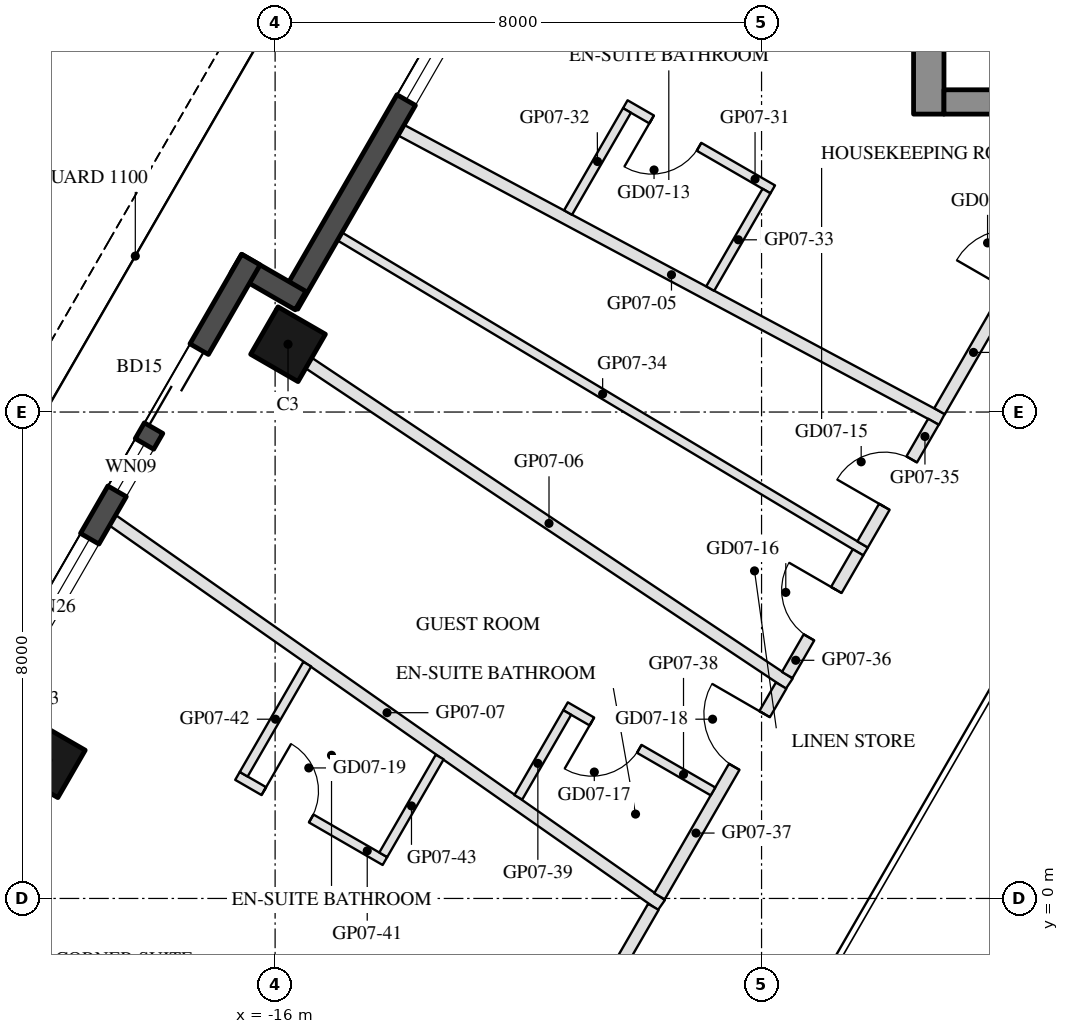
"""IFC4 building model, lengths in metres.
Left out: names, types, materials, properties, quantities, classifications, styles, units other than length and angle.
Written with IfcOpenShell. Run it as: python <this file> out.ifc"""

import sys

from ifc_helpers import new_model, si_unit, direction, frame, frame_2d, origin, origin_2d, place, context, subcontext, project, spatial, rectangle, hollow_rectangle, extrude, element, fill, save


model = new_model("IFC4")
c1 = context("Model", 3, precision=1e-05, world=origin(), true_north=direction((0.0, 1.0)))
c2 = subcontext(c1, "Body", "Model", "MODEL_VIEW")
j1 = project(units=[si_unit("LENGTHUNIT", "METRE"), si_unit("PLANEANGLEUNIT", "RADIAN")], contexts=[c1])
p1 = place(None, origin())
s1 = spatial("IfcSite", under=j1, at=p1, CompositionType="ELEMENT")
p2 = place(p1, origin())
s2 = spatial("IfcBuilding", under=s1, at=p2, CompositionType="ELEMENT")
p3 = place(p2, frame((0.0, 0.0, 94.6)))
s3 = spatial("IfcBuildingStorey", under=s2, at=p3, CompositionType="ELEMENT", Elevation=94.6)
for number, where, z_axis, x_axis in (
    (1, (-15.788, 9.115, 0.0), (0.0, 0.0, 1.0), (0.5, 0.866, 0.0)),
    (2, (-19.738, 2.273, 0.0), (0.0, 0.0, 1.0), (0.5, 0.866, 0.0)),
):
    element("IfcColumn", number, at=place(p3, frame(where, z_axis=z_axis, x_axis=x_axis)), inside=s3, PredefinedType="COLUMN", context=c2, shape_type="SweptSolid", body=[
        extrude(hollow_rectangle(XDim=0.9, YDim=0.9, WallThickness=0.04, at=origin_2d()), origin(), (0.0, 0.0, 1.0), 3.7),
    ])
p4 = place(p3, frame((-12.409, 15.617, 0.0), z_axis=(0.0, 0.0, 1.0), x_axis=(-0.500003597184, -0.866023326939, 0.0)))
e3 = element("IfcWall", 3, at=p4, inside=s3, PredefinedType="SOLIDWALL", context=c2, shape_type="SweptSolid", body=[
    extrude(rectangle(XDim=6.74, YDim=0.35, at=frame_2d((3.37, 0.0))), origin(), (0.0, 0.0, 1.0), 3.55),
])
p5 = place(p4, frame((0.77, 0.0, 0.3)))
e4 = element("IfcOpeningElement", 4, at=p5, cuts=e3, PredefinedType="OPENING", context=c2, shape_type="SweptSolid", body=[
    extrude(rectangle(XDim=2.1, YDim=2.65, at=frame_2d((1.05, 1.325))), frame((0.0, 0.185, 0.0), z_axis=(0.0, -1.0, 0.0), x_axis=(1.0, 0.0, 0.0)), (0.0, 0.0, 1.0), 0.37),
])
p6 = place(p3, frame((-15.581, 9.833, 0.0), z_axis=(0.0, 0.0, 1.0), x_axis=(-0.866055662726, 0.499947586314, 0.0)))
e5 = element("IfcWall", 5, at=p6, inside=s3, PredefinedType="SOLIDWALL", context=c2, shape_type="SweptSolid", body=[
    extrude(rectangle(XDim=1.22, YDim=0.35, at=frame_2d((0.61, 0.0))), origin(), (0.0, 0.0, 1.0), 3.55),
])
p7 = place(p3, frame((-16.398, 10.507, 0.0), z_axis=(0.0, 0.0, 1.0), x_axis=(-0.499999142773, -0.866025898704, 0.0)))
e6 = element("IfcWall", 6, at=p7, inside=s3, PredefinedType="SOLIDWALL", context=c2, shape_type="SweptSolid", body=[
    extrude(rectangle(XDim=9.7, YDim=0.35, at=frame_2d((4.85, 0.0))), origin(), (0.0, 0.0, 1.0), 3.55),
])
p8 = place(p7, frame((1.7, 0.0, 0.0)))
e7 = element("IfcOpeningElement", 7, at=p8, cuts=e6, PredefinedType="OPENING", context=c2, shape_type="SweptSolid", body=[
    extrude(rectangle(XDim=1.5, YDim=2.4, at=frame_2d((0.75, 1.2))), frame((0.0, 0.185, 0.0), z_axis=(0.0, -1.0, 0.0), x_axis=(1.0, 0.0, 0.0)), (0.0, 0.0, 1.0), 0.37),
])
p9 = place(p7, frame((3.5, 0.0, 0.3)))
e8 = element("IfcOpeningElement", 8, at=p9, cuts=e6, PredefinedType="OPENING", context=c2, shape_type="SweptSolid", body=[
    extrude(rectangle(XDim=0.9, YDim=2.65, at=frame_2d((0.45, 1.325))), frame((0.0, 0.185, 0.0), z_axis=(0.0, -1.0, 0.0), x_axis=(1.0, 0.0, 0.0)), (0.0, 0.0, 1.0), 0.37),
])
p10 = place(p7, frame((5.301, 0.0, 0.3)))
e9 = element("IfcOpeningElement", 9, at=p10, cuts=e6, PredefinedType="OPENING", context=c2, shape_type="SweptSolid", body=[
    extrude(rectangle(XDim=2.6, YDim=2.65, at=frame_2d((1.3, 1.325))), frame((0.0, 0.185, 0.0), z_axis=(0.0, -1.0, 0.0), x_axis=(1.0, 0.0, 0.0)), (0.0, 0.0, 1.0), 0.37),
])
p11 = place(p3, frame((-5.25, 12.9, 0.0), z_axis=(0.0, 0.0, 1.0), x_axis=(0.0, 1.0, 0.0)))
e10 = element("IfcWall", 10, at=p11, inside=s3, PredefinedType="SHEAR", context=c2, shape_type="SweptSolid", body=[
    extrude(rectangle(XDim=14.837, YDim=0.5, at=frame_2d((7.418, 0.0))), origin(), (0.0, 0.0, 1.0), 3.5),
])
p12 = place(p3, frame((5.0, 13.1, 0.0), z_axis=(0.0, 0.0, 1.0), x_axis=(-1.0, 0.0, 0.0)))
e11 = element("IfcWall", 11, at=p12, inside=s3, PredefinedType="SHEAR", context=c2, shape_type="SweptSolid", body=[
    extrude(rectangle(XDim=10.0, YDim=0.4, at=frame_2d((5.0, 0.0))), origin(), (0.0, 0.0, 1.0), 3.5),
])
p13 = place(p12, frame((3.55, 0.0, 0.0)))
e12 = element("IfcOpeningElement", 12, at=p13, cuts=e11, PredefinedType="OPENING", context=c2, shape_type="SweptSolid", body=[
    extrude(rectangle(XDim=1.1, YDim=2.1, at=frame_2d((0.55, 1.05))), frame((0.0, 0.21, 0.0), z_axis=(0.0, -1.0, 0.0), x_axis=(1.0, 0.0, 0.0)), (0.0, 0.0, 1.0), 0.42),
])
p14 = place(p12, frame((5.85, 0.0, 0.0)))
e13 = element("IfcOpeningElement", 13, at=p14, cuts=e11, PredefinedType="OPENING", context=c2, shape_type="SweptSolid", body=[
    extrude(rectangle(XDim=1.4, YDim=2.1, at=frame_2d((0.7, 1.05))), frame((0.0, 0.21, 0.0), z_axis=(0.0, -1.0, 0.0), x_axis=(1.0, 0.0, 0.0)), (0.0, 0.0, 1.0), 0.42),
])
p15 = place(p3, frame((-13.928, 12.636, 0.0), z_axis=(0.0, 0.0, 1.0), x_axis=(0.881791431821, -0.471639555981, 0.0)))
e14 = element("IfcWall", 14, at=p15, inside=s3, PredefinedType="PARTITIONING", context=c2, shape_type="SweptSolid", body=[
    extrude(rectangle(XDim=10.085, YDim=0.2, at=frame_2d((5.042, 0.0))), origin(), (0.0, 0.0, 1.0), 2.95),
])
p16 = place(p3, frame((-15.447, 8.806, 0.0), z_axis=(0.0, 0.0, 1.0), x_axis=(0.831801127359, -0.55507376494, 0.0)))
e15 = element("IfcWall", 15, at=p16, inside=s3, PredefinedType="PARTITIONING", context=c2, shape_type="SweptSolid", body=[
    extrude(rectangle(XDim=9.5, YDim=0.2, at=frame_2d((4.75, 0.0))), origin(), (0.0, 0.0, 1.0), 2.95),
])
p17 = place(p3, frame((-18.672, 6.219, 0.0), z_axis=(0.0, 0.0, 1.0), x_axis=(0.81879048929, -0.574092444341, 0.0)))
e16 = element("IfcWall", 16, at=p17, inside=s3, PredefinedType="PARTITIONING", context=c2, shape_type="SweptSolid", body=[
    extrude(rectangle(XDim=11.023, YDim=0.2, at=frame_2d((5.511, 0.0))), origin(), (0.0, 0.0, 1.0), 2.95),
])
p18 = place(p3, frame((-5.073, 8.013, 0.0), z_axis=(0.0, 0.0, 1.0), x_axis=(0.500003731568, 0.866023249352, 0.0)))
e17 = element("IfcWall", 17, at=p18, inside=s3, PredefinedType="PARTITIONING", context=c2, shape_type="SweptSolid", body=[
    extrude(rectangle(XDim=5.585, YDim=0.2, at=frame_2d((2.792, 0.0))), origin(), (0.0, 0.0, 1.0), 2.95),
])
p19 = place(p18, frame((2.292, 0.0, 0.0)))
e18 = element("IfcOpeningElement", 18, at=p19, cuts=e17, PredefinedType="OPENING", context=c2, shape_type="SweptSolid", body=[
    extrude(rectangle(XDim=1.0, YDim=2.1, at=frame_2d((0.5, 1.05))), frame((0.0, 0.11, 0.0), z_axis=(0.0, -1.0, 0.0), x_axis=(1.0, 0.0, 0.0)), (0.0, 0.0, 1.0), 0.22),
])
p20 = place(p3, frame((-7.816, 11.662, 0.0), z_axis=(0.0, 0.0, 1.0), x_axis=(-0.865996816683, 0.500049511043, 0.0)))
e19 = element("IfcWall", 19, at=p20, inside=s3, PredefinedType="PARTITIONING", context=c2, shape_type="SweptSolid", body=[
    extrude(rectangle(XDim=2.8, YDim=0.15, at=frame_2d((1.4, 0.0))), origin(), (0.0, 0.0, 1.0), 3.55),
])
p21 = place(p20, frame((1.4, 0.0, 0.0)))
e20 = element("IfcOpeningElement", 20, at=p21, cuts=e19, PredefinedType="OPENING", context=c2, shape_type="SweptSolid", body=[
    extrude(rectangle(XDim=0.9, YDim=2.1, at=frame_2d((0.45, 1.05))), frame((0.0, 0.085, 0.0), z_axis=(0.0, -1.0, 0.0), x_axis=(1.0, 0.0, 0.0)), (0.0, 0.0, 1.0), 0.17),
])
p22 = place(p3, frame((-10.213, 12.96, 0.0), z_axis=(0.0, 0.0, 1.0), x_axis=(-0.500013181875, -0.866017793092, 0.0)))
e21 = element("IfcWall", 21, at=p22, inside=s3, PredefinedType="PARTITIONING", context=c2, shape_type="SweptSolid", body=[
    extrude(rectangle(XDim=1.938, YDim=0.15, at=frame_2d((0.969, 0.0))), origin(), (0.0, 0.0, 1.0), 3.55),
])
p23 = place(p3, frame((-7.918, 11.635, 0.0), z_axis=(0.0, 0.0, 1.0), x_axis=(-0.499924019097, -0.866069266935, 0.0)))
e22 = element("IfcWall", 22, at=p23, inside=s3, PredefinedType="PARTITIONING", context=c2, shape_type="SweptSolid", body=[
    extrude(rectangle(XDim=1.852, YDim=0.15, at=frame_2d((0.926, 0.0))), origin(), (0.0, 0.0, 1.0), 3.55),
])
p24 = place(p3, frame((-14.937, 10.888, 0.0), z_axis=(0.0, 0.0, 1.0), x_axis=(0.857798338883, -0.513986390685, 0.0)))
e23 = element("IfcWall", 23, at=p24, inside=s3, PredefinedType="PARTITIONING", context=c2, shape_type="SweptSolid", body=[
    extrude(rectangle(XDim=10.081, YDim=0.15, at=frame_2d((5.041, 0.0))), origin(), (0.0, 0.0, 1.0), 2.96),
])
p25 = place(p3, frame((-6.338, 5.823, 0.0), z_axis=(0.0, 0.0, 1.0), x_axis=(0.499982502246, 0.866035505882, 0.0)))
e24 = element("IfcWall", 24, at=p25, inside=s3, PredefinedType="PARTITIONING", context=c2, shape_type="SweptSolid", body=[
    extrude(rectangle(XDim=2.33, YDim=0.2, at=frame_2d((1.165, 0.0))), origin(), (0.0, 0.0, 1.0), 2.95),
])
p26 = place(p25, frame((0.715, 0.0, 0.0)))
e25 = element("IfcOpeningElement", 25, at=p26, cuts=e24, PredefinedType="OPENING", context=c2, shape_type="SweptSolid", body=[
    extrude(rectangle(XDim=0.9, YDim=2.1, at=frame_2d((0.45, 1.05))), frame((0.0, 0.11, 0.0), z_axis=(0.0, -1.0, 0.0), x_axis=(1.0, 0.0, 0.0)), (0.0, 0.0, 1.0), 0.22),
])
p27 = place(p3, frame((-7.578, 3.675, 0.0), z_axis=(0.0, 0.0, 1.0), x_axis=(0.500061095026, 0.865990127681, 0.0)))
e26 = element("IfcWall", 26, at=p27, inside=s3, PredefinedType="PARTITIONING", context=c2, shape_type="SweptSolid", body=[
    extrude(rectangle(XDim=2.33, YDim=0.2, at=frame_2d((1.165, 0.0))), origin(), (0.0, 0.0, 1.0), 2.95),
])
p28 = place(p27, frame((0.715, 0.0, 0.0)))
e27 = element("IfcOpeningElement", 27, at=p28, cuts=e26, PredefinedType="OPENING", context=c2, shape_type="SweptSolid", body=[
    extrude(rectangle(XDim=0.9, YDim=2.1, at=frame_2d((0.45, 1.05))), frame((0.0, 0.11, 0.0), z_axis=(0.0, -1.0, 0.0), x_axis=(1.0, 0.0, 0.0)), (0.0, 0.0, 1.0), 0.22),
])
p29 = place(p3, frame((-9.679, 0.036, 0.0), z_axis=(0.0, 0.0, 1.0), x_axis=(0.499977712642, 0.866038271014, 0.0)))
e28 = element("IfcWall", 28, at=p29, inside=s3, PredefinedType="PARTITIONING", context=c2, shape_type="SweptSolid", body=[
    extrude(rectangle(XDim=4.002, YDim=0.2, at=frame_2d((2.001, 0.0))), origin(), (0.0, 0.0, 1.0), 2.95),
])
p30 = place(p29, frame((2.459, 0.0, 0.0)))
e29 = element("IfcOpeningElement", 29, at=p30, cuts=e28, PredefinedType="OPENING", context=c2, shape_type="SweptSolid", body=[
    extrude(rectangle(XDim=1.0, YDim=2.1, at=frame_2d((0.5, 1.05))), frame((0.0, 0.11, 0.0), z_axis=(0.0, -1.0, 0.0), x_axis=(1.0, 0.0, 0.0)), (0.0, 0.0, 1.0), 0.22),
])
p31 = place(p3, frame((-8.799, 1.76, 0.0), z_axis=(0.0, 0.0, 1.0), x_axis=(-0.866034573852, 0.49998411664, 0.0)))
e30 = element("IfcWall", 30, at=p31, inside=s3, PredefinedType="PARTITIONING", context=c2, shape_type="SweptSolid", body=[
    extrude(rectangle(XDim=2.8, YDim=0.15, at=frame_2d((1.4, 0.0))), origin(), (0.0, 0.0, 1.0), 3.55),
])
p32 = place(p31, frame((1.4, 0.0, 0.0)))
e31 = element("IfcOpeningElement", 31, at=p32, cuts=e30, PredefinedType="OPENING", context=c2, shape_type="SweptSolid", body=[
    extrude(rectangle(XDim=0.9, YDim=2.1, at=frame_2d((0.45, 1.05))), frame((0.0, 0.085, 0.0), z_axis=(0.0, -1.0, 0.0), x_axis=(1.0, 0.0, 0.0)), (0.0, 0.0, 1.0), 0.17),
])
p33 = place(p3, frame((-11.196, 3.058, 0.0), z_axis=(0.0, 0.0, 1.0), x_axis=(-0.500085588237, -0.865975983754, 0.0)))
e32 = element("IfcWall", 32, at=p33, inside=s3, PredefinedType="PARTITIONING", context=c2, shape_type="SweptSolid", body=[
    extrude(rectangle(XDim=1.61, YDim=0.15, at=frame_2d((0.805, 0.0))), origin(), (0.0, 0.0, 1.0), 2.95),
])
p34 = place(p3, frame((-12.269, -4.45, 0.0), z_axis=(0.0, 0.0, 1.0), x_axis=(0.500015331954, 0.866016551696, 0.0)))
e33 = element("IfcWall", 33, at=p34, inside=s3, PredefinedType="PARTITIONING", context=c2, shape_type="SweptSolid", body=[
    extrude(rectangle(XDim=4.979, YDim=0.2, at=frame_2d((2.489, 0.0))), origin(), (0.0, 0.0, 1.0), 2.95),
])
p35 = place(p34, frame((1.99, 0.0, 0.0)))
e34 = element("IfcOpeningElement", 34, at=p35, cuts=e33, PredefinedType="OPENING", context=c2, shape_type="SweptSolid", body=[
    extrude(rectangle(XDim=1.0, YDim=2.1, at=frame_2d((0.5, 1.05))), frame((0.0, 0.11, 0.0), z_axis=(0.0, -1.0, 0.0), x_axis=(1.0, 0.0, 0.0)), (0.0, 0.0, 1.0), 0.22),
])
p36 = place(p3, frame((-16.619, 2.015, 0.0), z_axis=(0.0, 0.0, 1.0), x_axis=(0.865996816683, -0.500049511043, 0.0)))
e35 = element("IfcWall", 35, at=p36, inside=s3, PredefinedType="PARTITIONING", context=c2, shape_type="SweptSolid", body=[
    extrude(rectangle(XDim=2.8, YDim=0.15, at=frame_2d((1.4, 0.0))), origin(), (0.0, 0.0, 1.0), 3.55),
])
p37 = place(p36, frame((0.5, 0.0, 0.0)))
e36 = element("IfcOpeningElement", 36, at=p37, cuts=e35, PredefinedType="OPENING", context=c2, shape_type="SweptSolid", body=[
    extrude(rectangle(XDim=0.9, YDim=2.1, at=frame_2d((0.45, 1.05))), frame((0.0, 0.085, 0.0), z_axis=(0.0, -1.0, 0.0), x_axis=(1.0, 0.0, 0.0)), (0.0, 0.0, 1.0), 0.17),
])
p38 = place(p3, frame((-15.471, 3.853, 0.0), z_axis=(0.0, 0.0, 1.0), x_axis=(-0.500046000743, -0.865998843614, 0.0)))
e37 = element("IfcWall", 37, at=p38, inside=s3, PredefinedType="PARTITIONING", context=c2, shape_type="SweptSolid", body=[
    extrude(rectangle(XDim=2.09, YDim=0.15, at=frame_2d((1.045, 0.0))), origin(), (0.0, 0.0, 1.0), 3.55),
])
p39 = place(p3, frame((-13.293, 2.326, 0.0), z_axis=(0.0, 0.0, 1.0), x_axis=(-0.499957702264, -0.866049823017, 0.0)))
e38 = element("IfcWall", 38, at=p39, inside=s3, PredefinedType="PARTITIONING", context=c2, shape_type="SweptSolid", body=[
    extrude(rectangle(XDim=1.857, YDim=0.15, at=frame_2d((0.928, 0.0))), origin(), (0.0, 0.0, 1.0), 3.55),
])
p40 = place(p5, origin())
e39 = element("IfcWindow", 39, at=p40, inside=s3, PartitioningType="SINGLE_PANEL", PredefinedType="WINDOW", context=c2, shape_type="SweptSolid", body=[
    extrude(rectangle(XDim=2.1, YDim=2.65, at=frame_2d((1.05, 1.325))), frame((0.0, 0.03, 0.0), z_axis=(0.0, -1.0, 0.0), x_axis=(1.0, 0.0, 0.0)), (0.0, 0.0, 1.0), 0.06),
])
fill(e4, e39)
p41 = place(p8, frame((1.5, 0.0, 0.0), z_axis=(0.0, 0.0, 1.0), x_axis=(-1.0, 0.0, 0.0)))
e40 = element("IfcDoor", 40, at=p41, inside=s3, OperationType="SLIDING_TO_LEFT", PredefinedType="DOOR", context=c2, shape_type="SweptSolid", body=[
    extrude(rectangle(XDim=1.5, YDim=2.4, at=frame_2d((0.75, 1.2))), frame((0.0, 0.025, 0.0), z_axis=(0.0, -1.0, 0.0), x_axis=(1.0, 0.0, 0.0)), (0.0, 0.0, 1.0), 0.05),
])
fill(e7, e40)
p42 = place(p9, origin())
e41 = element("IfcWindow", 41, at=p42, inside=s3, PartitioningType="SINGLE_PANEL", PredefinedType="WINDOW", context=c2, shape_type="SweptSolid", body=[
    extrude(rectangle(XDim=0.9, YDim=2.65, at=frame_2d((0.45, 1.325))), frame((0.0, 0.03, 0.0), z_axis=(0.0, -1.0, 0.0), x_axis=(1.0, 0.0, 0.0)), (0.0, 0.0, 1.0), 0.06),
])
fill(e8, e41)
p43 = place(p10, origin())
e42 = element("IfcWindow", 42, at=p43, inside=s3, PartitioningType="SINGLE_PANEL", PredefinedType="WINDOW", context=c2, shape_type="SweptSolid", body=[
    extrude(rectangle(XDim=2.6, YDim=2.65, at=frame_2d((1.3, 1.325))), frame((0.0, 0.03, 0.0), z_axis=(0.0, -1.0, 0.0), x_axis=(1.0, 0.0, 0.0)), (0.0, 0.0, 1.0), 0.06),
])
fill(e9, e42)
p44 = place(p21, origin())
e43 = element("IfcDoor", 43, at=p44, inside=s3, OperationType="SINGLE_SWING_RIGHT", PredefinedType="DOOR", context=c2, shape_type="SweptSolid", body=[
    extrude(rectangle(XDim=0.9, YDim=2.1, at=frame_2d((0.45, 1.05))), frame((0.0, 0.025, 0.0), z_axis=(0.0, -1.0, 0.0), x_axis=(1.0, 0.0, 0.0)), (0.0, 0.0, 1.0), 0.05),
])
fill(e20, e43)
p45 = place(p26, origin())
e44 = element("IfcDoor", 44, at=p45, inside=s3, OperationType="SINGLE_SWING_LEFT", PredefinedType="DOOR", context=c2, shape_type="SweptSolid", body=[
    extrude(rectangle(XDim=0.9, YDim=2.1, at=frame_2d((0.45, 1.05))), frame((0.0, 0.025, 0.0), z_axis=(0.0, -1.0, 0.0), x_axis=(1.0, 0.0, 0.0)), (0.0, 0.0, 1.0), 0.05),
])
fill(e25, e44)
p46 = place(p28, origin())
e45 = element("IfcDoor", 45, at=p46, inside=s3, OperationType="SINGLE_SWING_RIGHT", PredefinedType="DOOR", context=c2, shape_type="SweptSolid", body=[
    extrude(rectangle(XDim=0.9, YDim=2.1, at=frame_2d((0.45, 1.05))), frame((0.0, 0.025, 0.0), z_axis=(0.0, -1.0, 0.0), x_axis=(1.0, 0.0, 0.0)), (0.0, 0.0, 1.0), 0.05),
])
fill(e27, e45)
p47 = place(p32, origin())
e46 = element("IfcDoor", 46, at=p47, inside=s3, OperationType="SINGLE_SWING_RIGHT", PredefinedType="DOOR", context=c2, shape_type="SweptSolid", body=[
    extrude(rectangle(XDim=0.9, YDim=2.1, at=frame_2d((0.45, 1.05))), frame((0.0, 0.025, 0.0), z_axis=(0.0, -1.0, 0.0), x_axis=(1.0, 0.0, 0.0)), (0.0, 0.0, 1.0), 0.05),
])
fill(e31, e46)
p48 = place(p30, origin())
e47 = element("IfcDoor", 47, at=p48, inside=s3, OperationType="SINGLE_SWING_RIGHT", PredefinedType="DOOR", context=c2, shape_type="SweptSolid", body=[
    extrude(rectangle(XDim=1.0, YDim=2.1, at=frame_2d((0.5, 1.05))), frame((0.0, 0.025, 0.0), z_axis=(0.0, -1.0, 0.0), x_axis=(1.0, 0.0, 0.0)), (0.0, 0.0, 1.0), 0.05),
])
fill(e29, e47)
p49 = place(p37, origin())
e48 = element("IfcDoor", 48, at=p49, inside=s3, OperationType="SINGLE_SWING_LEFT", PredefinedType="DOOR", context=c2, shape_type="SweptSolid", body=[
    extrude(rectangle(XDim=0.9, YDim=2.1, at=frame_2d((0.45, 1.05))), frame((0.0, 0.025, 0.0), z_axis=(0.0, -1.0, 0.0), x_axis=(1.0, 0.0, 0.0)), (0.0, 0.0, 1.0), 0.05),
])
fill(e36, e48)
save(model, sys.argv[1])
